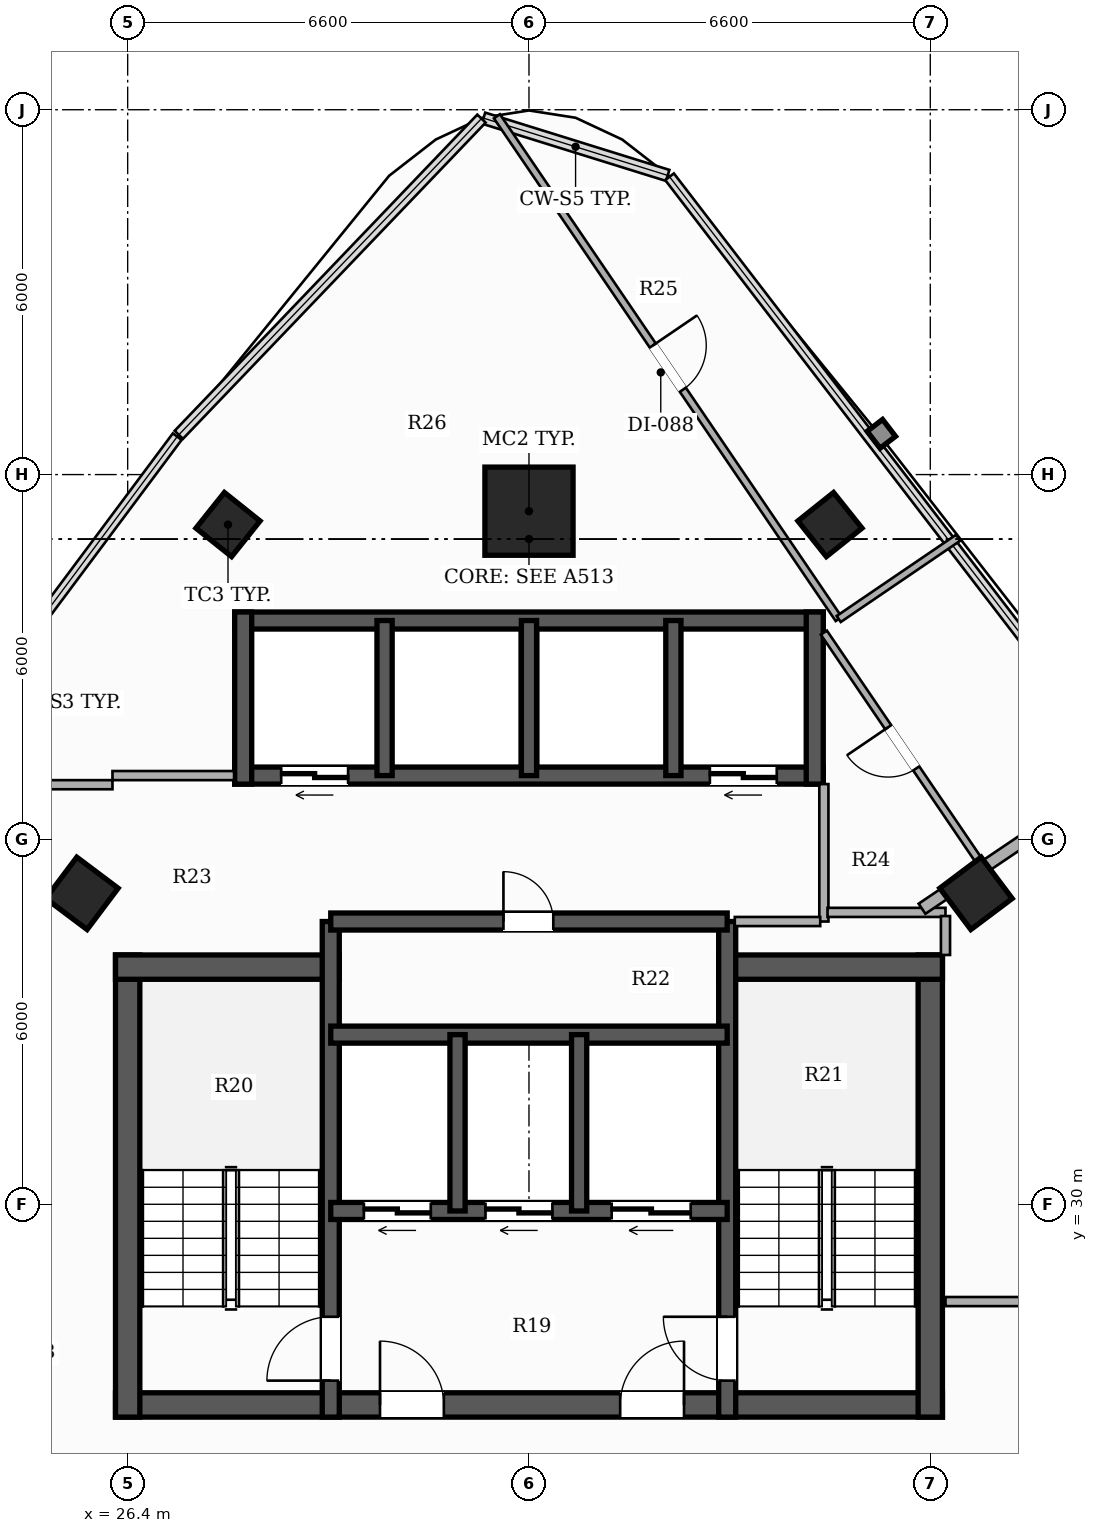
"""IFC4 building model, lengths in metres.
Left out: names, types, materials, properties, quantities, classifications, styles, units other than length and angle.
Written with IfcOpenShell. Run it as: python <this file> out.ifc"""

import sys

from ifc_helpers import new_model, si_unit, direction, frame, frame_2d, origin, origin_2d, place, context, subcontext, project, spatial, rectangle, hollow_rectangle, extrude, element, fill, save


model = new_model("IFC4")
c1 = context("Model", 3, precision=1e-05, world=origin(), true_north=direction((0.0, 1.0)))
c2 = subcontext(c1, "Body", "Model", "MODEL_VIEW")
j1 = project(units=[si_unit("LENGTHUNIT", "METRE"), si_unit("PLANEANGLEUNIT", "RADIAN")], contexts=[c1])
p1 = place(None, origin())
s1 = spatial("IfcSite", under=j1, at=p1, CompositionType="ELEMENT")
p2 = place(p1, origin())
s2 = spatial("IfcBuilding", under=s1, at=p2, CompositionType="ELEMENT")
p3 = place(p2, frame((0.0, 0.0, 167.15)))
s3 = spatial("IfcBuildingStorey", under=s2, at=p3, CompositionType="ELEMENT", Elevation=167.15)
p4 = place(p3, frame((26.2, 26.7, 0.0), z_axis=(0.0, 0.0, 1.0), x_axis=(1.0, 0.0, 0.0)))
e1 = element("IfcWall", 1, at=p4, inside=s3, PredefinedType="SHEAR", context=c2, shape_type="SweptSolid", body=[
    extrude(rectangle(XDim=13.6, YDim=0.4, at=frame_2d((6.8, 0.0))), origin(), (0.0, 0.0, 1.0), 3.3),
])
p5 = place(p4, frame((4.35, 0.0, 0.0)))
e2 = element("IfcOpeningElement", 2, at=p5, cuts=e1, PredefinedType="OPENING", context=c2, shape_type="SweptSolid", body=[
    extrude(rectangle(XDim=1.05, YDim=2.15, at=frame_2d((0.525, 1.075))), frame((0.0, 0.21, 0.0), z_axis=(0.0, -1.0, 0.0), x_axis=(1.0, 0.0, 0.0)), (0.0, 0.0, 1.0), 0.42),
])
p6 = place(p4, frame((8.3, 0.0, 0.0)))
e3 = element("IfcOpeningElement", 3, at=p6, cuts=e1, PredefinedType="OPENING", context=c2, shape_type="SweptSolid", body=[
    extrude(rectangle(XDim=1.05, YDim=2.15, at=frame_2d((0.525, 1.075))), frame((0.0, 0.21, 0.0), z_axis=(0.0, -1.0, 0.0), x_axis=(1.0, 0.0, 0.0)), (0.0, 0.0, 1.0), 0.42),
])
p7 = place(p3, frame((26.4, 26.5, 0.0), z_axis=(0.0, 0.0, 1.0), x_axis=(0.0, 1.0, 0.0)))
e4 = element("IfcWall", 4, at=p7, inside=s3, PredefinedType="SHEAR", context=c2, shape_type="SweptSolid", body=[
    extrude(rectangle(XDim=7.6, YDim=0.4, at=frame_2d((3.8, 0.0))), origin(), (0.0, 0.0, 1.0), 3.3),
])
p8 = place(p3, frame((26.2, 33.9, 0.0), z_axis=(0.0, 0.0, 1.0), x_axis=(1.0, 0.0, 0.0)))
e5 = element("IfcWall", 5, at=p8, inside=s3, PredefinedType="SHEAR", context=c2, shape_type="SweptSolid", body=[
    extrude(rectangle(XDim=3.68, YDim=0.4, at=frame_2d((1.84, 0.0))), origin(), (0.0, 0.0, 1.0), 3.3),
])
p9 = place(p3, frame((39.6, 26.5, 0.0), z_axis=(0.0, 0.0, 1.0), x_axis=(0.0, 1.0, 0.0)))
e6 = element("IfcWall", 6, at=p9, inside=s3, PredefinedType="SHEAR", context=c2, shape_type="SweptSolid", body=[
    extrude(rectangle(XDim=7.6, YDim=0.4, at=frame_2d((3.8, 0.0))), origin(), (0.0, 0.0, 1.0), 3.3),
])
p10 = place(p3, frame((36.12, 33.9, 0.0), z_axis=(0.0, 0.0, 1.0), x_axis=(1.0, 0.0, 0.0)))
e7 = element("IfcWall", 7, at=p10, inside=s3, PredefinedType="SHEAR", context=c2, shape_type="SweptSolid", body=[
    extrude(rectangle(XDim=3.68, YDim=0.4, at=frame_2d((1.84, 0.0))), origin(), (0.0, 0.0, 1.0), 3.3),
])
p11 = place(p3, frame((29.74, 26.5, 0.0), z_axis=(0.0, 0.0, 1.0), x_axis=(0.0, 1.0, 0.0)))
e8 = element("IfcWall", 8, at=p11, inside=s3, PredefinedType="SHEAR", context=c2, shape_type="SweptSolid", body=[
    extrude(rectangle(XDim=8.15, YDim=0.28, at=frame_2d((4.075, 0.0))), origin(), (0.0, 0.0, 1.0), 3.3),
])
p12 = place(p11, frame((0.6, 0.0, 0.0)))
e9 = element("IfcOpeningElement", 9, at=p12, cuts=e8, PredefinedType="OPENING", context=c2, shape_type="SweptSolid", body=[
    extrude(rectangle(XDim=1.05, YDim=2.15, at=frame_2d((0.525, 1.075))), frame((0.0, 0.15, 0.0), z_axis=(0.0, -1.0, 0.0), x_axis=(1.0, 0.0, 0.0)), (0.0, 0.0, 1.0), 0.3),
])
p13 = place(p3, frame((36.26, 26.5, 0.0), z_axis=(0.0, 0.0, 1.0), x_axis=(0.0, 1.0, 0.0)))
e10 = element("IfcWall", 10, at=p13, inside=s3, PredefinedType="SHEAR", context=c2, shape_type="SweptSolid", body=[
    extrude(rectangle(XDim=8.15, YDim=0.28, at=frame_2d((4.075, 0.0))), origin(), (0.0, 0.0, 1.0), 3.3),
])
p14 = place(p13, frame((0.6, 0.0, 0.0)))
e11 = element("IfcOpeningElement", 11, at=p14, cuts=e10, PredefinedType="OPENING", context=c2, shape_type="SweptSolid", body=[
    extrude(rectangle(XDim=1.05, YDim=2.15, at=frame_2d((0.525, 1.075))), frame((0.0, 0.15, 0.0), z_axis=(0.0, -1.0, 0.0), x_axis=(1.0, 0.0, 0.0)), (0.0, 0.0, 1.0), 0.3),
])
p15 = place(p3, frame((36.26, 29.89, 0.0), z_axis=(0.0, 0.0, 1.0), x_axis=(-1.0, 0.0, 0.0)))
e12 = element("IfcWall", 12, at=p15, inside=s3, PredefinedType="SHEAR", context=c2, shape_type="SweptSolid", body=[
    extrude(rectangle(XDim=6.52, YDim=0.28, at=frame_2d((3.26, 0.0))), origin(), (0.0, 0.0, 1.0), 3.3),
])
p16 = place(p15, frame((4.875, 0.0, 0.0)))
e13 = element("IfcOpeningElement", 13, at=p16, cuts=e12, PredefinedType="OPENING", context=c2, shape_type="SweptSolid", body=[
    extrude(rectangle(XDim=1.1, YDim=2.2, at=frame_2d((0.55, 1.1))), frame((0.0, 0.15, 0.0), z_axis=(0.0, -1.0, 0.0), x_axis=(1.0, 0.0, 0.0)), (0.0, 0.0, 1.0), 0.3),
])
p17 = place(p15, frame((2.875, 0.0, 0.0)))
e14 = element("IfcOpeningElement", 14, at=p17, cuts=e12, PredefinedType="OPENING", context=c2, shape_type="SweptSolid", body=[
    extrude(rectangle(XDim=1.1, YDim=2.2, at=frame_2d((0.55, 1.1))), frame((0.0, 0.15, 0.0), z_axis=(0.0, -1.0, 0.0), x_axis=(1.0, 0.0, 0.0)), (0.0, 0.0, 1.0), 0.3),
])
p18 = place(p15, frame((0.6, 0.0, 0.0)))
e15 = element("IfcOpeningElement", 15, at=p18, cuts=e12, PredefinedType="OPENING", context=c2, shape_type="SweptSolid", body=[
    extrude(rectangle(XDim=1.3, YDim=2.2, at=frame_2d((0.65, 1.1))), frame((0.0, 0.15, 0.0), z_axis=(0.0, -1.0, 0.0), x_axis=(1.0, 0.0, 0.0)), (0.0, 0.0, 1.0), 0.3),
])
p19 = place(p3, frame((29.74, 32.79, 0.0), z_axis=(0.0, 0.0, 1.0), x_axis=(1.0, 0.0, 0.0)))
e16 = element("IfcWall", 16, at=p19, inside=s3, PredefinedType="SHEAR", context=c2, shape_type="SweptSolid", body=[
    extrude(rectangle(XDim=6.52, YDim=0.28, at=frame_2d((3.26, 0.0))), origin(), (0.0, 0.0, 1.0), 3.3),
])
for number, where, z_axis, x_axis in (
    (17, (31.825, 29.89, 0.0), (0.0, 0.0, 1.0), (0.0, 1.0, 0.0)),
    (18, (33.825, 29.89, 0.0), (0.0, 0.0, 1.0), (0.0, 1.0, 0.0)),
):
    element("IfcWall", number, at=place(p3, frame(where, z_axis=z_axis, x_axis=x_axis)), inside=s3, PredefinedType="SHEAR", context=c2, shape_type="SweptSolid", body=[
        extrude(rectangle(XDim=2.9, YDim=0.25, at=frame_2d((1.45, 0.0))), origin(), (0.0, 0.0, 1.0), 3.3),
    ])
p20 = place(p3, frame((29.74, 34.65, 0.0), z_axis=(0.0, 0.0, 1.0), x_axis=(1.0, 0.0, 0.0)))
e19 = element("IfcWall", 19, at=p20, inside=s3, PredefinedType="SHEAR", context=c2, shape_type="SweptSolid", body=[
    extrude(rectangle(XDim=6.52, YDim=0.28, at=frame_2d((3.26, 0.0))), origin(), (0.0, 0.0, 1.0), 3.3),
])
p21 = place(p20, frame((2.84, 0.0, 0.0)))
e20 = element("IfcOpeningElement", 20, at=p21, cuts=e19, PredefinedType="OPENING", context=c2, shape_type="SweptSolid", body=[
    extrude(rectangle(XDim=0.82, YDim=2.1, at=frame_2d((0.41, 1.05))), frame((0.0, 0.15, 0.0), z_axis=(0.0, -1.0, 0.0), x_axis=(1.0, 0.0, 0.0)), (0.0, 0.0, 1.0), 0.3),
])
p22 = place(p3, frame((37.84, 37.05, 0.0), z_axis=(0.0, 0.0, 1.0), x_axis=(-1.0, 0.0, 0.0)))
e21 = element("IfcWall", 21, at=p22, inside=s3, PredefinedType="SHEAR", context=c2, shape_type="SweptSolid", body=[
    extrude(rectangle(XDim=9.68, YDim=0.28, at=frame_2d((4.84, 0.0))), origin(), (0.0, 0.0, 1.0), 3.3),
])
p23 = place(p22, frame((7.815, 0.0, 0.0)))
e22 = element("IfcOpeningElement", 22, at=p23, cuts=e21, PredefinedType="OPENING", context=c2, shape_type="SweptSolid", body=[
    extrude(rectangle(XDim=1.1, YDim=2.2, at=frame_2d((0.55, 1.1))), frame((0.0, 0.15, 0.0), z_axis=(0.0, -1.0, 0.0), x_axis=(1.0, 0.0, 0.0)), (0.0, 0.0, 1.0), 0.3),
])
p24 = place(p22, frame((0.765, 0.0, 0.0)))
e23 = element("IfcOpeningElement", 23, at=p24, cuts=e21, PredefinedType="OPENING", context=c2, shape_type="SweptSolid", body=[
    extrude(rectangle(XDim=1.1, YDim=2.2, at=frame_2d((0.55, 1.1))), frame((0.0, 0.15, 0.0), z_axis=(0.0, -1.0, 0.0), x_axis=(1.0, 0.0, 0.0)), (0.0, 0.0, 1.0), 0.3),
])
p25 = place(p3, frame((28.16, 39.6, 0.0), z_axis=(0.0, 0.0, 1.0), x_axis=(1.0, 0.0, 0.0)))
e24 = element("IfcWall", 24, at=p25, inside=s3, PredefinedType="SHEAR", context=c2, shape_type="SweptSolid", body=[
    extrude(rectangle(XDim=9.68, YDim=0.28, at=frame_2d((4.84, 0.0))), origin(), (0.0, 0.0, 1.0), 3.3),
])
for number, where, z_axis, x_axis in (
    (25, (28.3, 36.91, 0.0), (0.0, 0.0, 1.0), (0.0, 1.0, 0.0)),
    (26, (37.7, 36.91, 0.0), (0.0, 0.0, 1.0), (0.0, 1.0, 0.0)),
):
    element("IfcWall", number, at=place(p3, frame(where, z_axis=z_axis, x_axis=x_axis)), inside=s3, PredefinedType="SHEAR", context=c2, shape_type="SweptSolid", body=[
        extrude(rectangle(XDim=2.83, YDim=0.28, at=frame_2d((1.415, 0.0))), origin(), (0.0, 0.0, 1.0), 3.3),
    ])
for number, where, z_axis, x_axis in (
    (27, (30.625, 37.05, 0.0), (0.0, 0.0, 1.0), (0.0, 1.0, 0.0)),
    (28, (33.0, 37.05, 0.0), (0.0, 0.0, 1.0), (0.0, 1.0, 0.0)),
    (29, (35.375, 37.05, 0.0), (0.0, 0.0, 1.0), (0.0, 1.0, 0.0)),
):
    element("IfcWall", number, at=place(p3, frame(where, z_axis=z_axis, x_axis=x_axis)), inside=s3, PredefinedType="SHEAR", context=c2, shape_type="SweptSolid", body=[
        extrude(rectangle(XDim=2.55, YDim=0.25, at=frame_2d((1.275, 0.0))), origin(), (0.0, 0.0, 1.0), 3.3),
    ])
p26 = place(p3, frame((33.0, 41.398, 0.0), z_axis=(0.0, 0.0, 1.0), x_axis=(1.0, 0.0, 0.0)))
e30 = element("IfcColumn", 30, at=p26, inside=s3, PredefinedType="COLUMN", context=c2, shape_type="SweptSolid", body=[
    extrude(hollow_rectangle(XDim=1.45, YDim=1.45, WallThickness=0.045, at=origin_2d()), origin(), (0.0, 0.0, 1.0), 3.3),
])
for number, where, z_axis, x_axis in (
    (31, (25.648, 35.113, 0.0), (0.0, 0.0, 1.0), (0.6, 0.8, 0.0)),
    (32, (40.352, 35.113, 0.0), (0.0, 0.0, 1.0), (-0.6, 0.8, 0.0)),
):
    element("IfcColumn", number, at=place(p3, frame(where, z_axis=z_axis, x_axis=x_axis)), inside=s3, PredefinedType="COLUMN", context=c2, shape_type="SweptSolid", body=[
        extrude(hollow_rectangle(XDim=0.85, YDim=0.85, WallThickness=0.028, at=origin_2d()), origin(), (0.0, 0.0, 1.0), 3.3),
    ])
for number, where, z_axis, x_axis in (
    (33, (28.05, 41.178, 0.0), (0.0, 0.0, 1.0), (0.624, 0.782, 0.0)),
    (34, (37.95, 41.178, 0.0), (0.0, 0.0, 1.0), (-0.624, 0.782, 0.0)),
):
    element("IfcColumn", number, at=place(p3, frame(where, z_axis=z_axis, x_axis=x_axis)), inside=s3, PredefinedType="COLUMN", context=c2, shape_type="SweptSolid", body=[
        extrude(hollow_rectangle(XDim=0.75, YDim=0.75, WallThickness=0.025, at=origin_2d()), origin(), (0.0, 0.0, 1.0), 3.3),
    ])
p27 = place(p3, frame((37.85, 34.65, 0.0), z_axis=(0.0, 0.0, 1.0), x_axis=(0.0, 1.0, 0.0)))
e35 = element("IfcWall", 35, at=p27, inside=s3, PredefinedType="PARTITIONING", context=c2, shape_type="SweptSolid", body=[
    extrude(rectangle(XDim=2.26, YDim=0.15, at=frame_2d((1.13, 0.0))), origin(), (0.0, 0.0, 1.0), 3.06),
])
p28 = place(p3, frame((36.385, 34.65, 0.0), z_axis=(0.0, 0.0, 1.0), x_axis=(1.0, 0.0, 0.0)))
e36 = element("IfcWall", 36, at=p28, inside=s3, PredefinedType="PARTITIONING", context=c2, shape_type="SweptSolid", body=[
    extrude(rectangle(XDim=1.405, YDim=0.15, at=frame_2d((0.703, 0.0))), origin(), (0.0, 0.0, 1.0), 2.425),
])
p29 = place(p3, frame((23.56, 36.9, 0.0), z_axis=(0.0, 0.0, 1.0), x_axis=(1.0, 0.0, 0.0)))
e37 = element("IfcWall", 37, at=p29, inside=s3, PredefinedType="PARTITIONING", context=c2, shape_type="SweptSolid", body=[
    extrude(rectangle(XDim=2.59, YDim=0.15, at=frame_2d((1.295, 0.0))), origin(), (0.0, 0.0, 1.0), 2.413),
])
p30 = place(p3, frame((39.85, 28.4, 0.0), z_axis=(0.0, 0.0, 1.0), x_axis=(1.0, 0.0, 0.0)))
e38 = element("IfcWall", 38, at=p30, inside=s3, PredefinedType="PARTITIONING", context=c2, shape_type="SweptSolid", body=[
    extrude(rectangle(XDim=2.5, YDim=0.15, at=frame_2d((1.25, 0.0))), origin(), (0.0, 0.0, 1.0), 2.721),
])
p31 = place(p3, frame((26.15, 37.05, 0.0), z_axis=(0.0, 0.0, 1.0), x_axis=(1.0, 0.0, 0.0)))
e39 = element("IfcWall", 39, at=p31, inside=s3, PredefinedType="PARTITIONING", context=c2, shape_type="SweptSolid", body=[
    extrude(rectangle(XDim=2.0, YDim=0.15, at=frame_2d((1.0, 0.0))), origin(), (0.0, 0.0, 1.0), 2.413),
])
p32 = place(p3, frame((37.91, 34.8, 0.0), z_axis=(0.0, 0.0, 1.0), x_axis=(1.0, 0.0, 0.0)))
e40 = element("IfcWall", 40, at=p32, inside=s3, PredefinedType="PARTITIONING", context=c2, shape_type="SweptSolid", body=[
    extrude(rectangle(XDim=1.94, YDim=0.15, at=frame_2d((0.97, 0.0))), origin(), (0.0, 0.0, 1.0), 2.721),
])
p33 = place(p3, frame((39.85, 34.74, 0.0), z_axis=(0.0, 0.0, 1.0), x_axis=(0.0, -1.0, 0.0)))
e41 = element("IfcWall", 41, at=p33, inside=s3, PredefinedType="PARTITIONING", context=c2, shape_type="SweptSolid", body=[
    extrude(rectangle(XDim=0.64, YDim=0.15, at=frame_2d((0.32, 0.0))), origin(), (0.0, 0.0, 1.0), 2.721),
])
p34 = place(p3, frame((39.464, 34.86, 0.0), z_axis=(0.0, 0.0, 1.0), x_axis=(0.828976210701, 0.559283865395, 0.0)))
e42 = element("IfcWall", 42, at=p34, inside=s3, PredefinedType="PARTITIONING", context=c2, shape_type="SweptSolid", body=[
    extrude(rectangle(XDim=4.171, YDim=0.2, at=frame_2d((2.086, 0.0))), origin(), (0.0, 0.0, 1.0), 2.413),
])
p35 = place(p3, frame((40.427, 35.612, 0.0), z_axis=(0.0, 0.0, 1.0), x_axis=(-0.562385802303, 0.826874965982, 0.0)))
e43 = element("IfcWall", 43, at=p35, inside=s3, PredefinedType="PARTITIONING", context=c2, shape_type="SweptSolid", body=[
    extrude(rectangle(XDim=4.582, YDim=0.12, at=frame_2d((2.291, 0.0))), origin(), (0.0, 0.0, 1.0), 2.413),
])
p36 = place(p35, frame((1.881, 0.0, 0.0)))
e44 = element("IfcOpeningElement", 44, at=p36, cuts=e43, PredefinedType="OPENING", context=c2, shape_type="SweptSolid", body=[
    extrude(rectangle(XDim=0.82, YDim=2.1, at=frame_2d((0.41, 1.05))), frame((0.0, 0.07, 0.0), z_axis=(0.0, -1.0, 0.0), x_axis=(1.0, 0.0, 0.0)), (0.0, 0.0, 1.0), 0.14),
])
p37 = place(p3, frame((32.473, 47.892, 0.0), z_axis=(0.0, 0.0, 1.0), x_axis=(0.562273950157, -0.826951029369, 0.0)))
e45 = element("IfcWall", 45, at=p37, inside=s3, PredefinedType="PARTITIONING", context=c2, shape_type="SweptSolid", body=[
    extrude(rectangle(XDim=9.997, YDim=0.12, at=frame_2d((4.999, 0.0))), origin(), (0.0, 0.0, 1.0), 2.413),
])
p38 = place(p37, frame((4.558, 0.0, 0.0)))
e46 = element("IfcOpeningElement", 46, at=p38, cuts=e45, PredefinedType="OPENING", context=c2, shape_type="SweptSolid", body=[
    extrude(rectangle(XDim=0.88, YDim=2.1, at=frame_2d((0.44, 1.05))), frame((0.0, 0.07, 0.0), z_axis=(0.0, -1.0, 0.0), x_axis=(1.0, 0.0, 0.0)), (0.0, 0.0, 1.0), 0.14),
])
p39 = place(p3, frame((38.094, 39.625, 0.0), z_axis=(0.0, 0.0, 1.0), x_axis=(0.826798473187, 0.562498253096, 0.0)))
e47 = element("IfcWall", 47, at=p39, inside=s3, PredefinedType="PARTITIONING", context=c2, shape_type="SweptSolid", body=[
    extrude(rectangle(XDim=2.377, YDim=0.12, at=frame_2d((1.188, 0.0))), origin(), (0.0, 0.0, 1.0), 2.413),
])
p40 = place(p12, origin())
e48 = element("IfcDoor", 48, at=p40, inside=s3, OperationType="SINGLE_SWING_LEFT", PredefinedType="DOOR", context=c2, shape_type="SweptSolid", body=[
    extrude(rectangle(XDim=1.05, YDim=2.15, at=frame_2d((0.525, 1.075))), frame((0.0, 0.025, 0.0), z_axis=(0.0, -1.0, 0.0), x_axis=(1.0, 0.0, 0.0)), (0.0, 0.0, 1.0), 0.05),
])
fill(e9, e48)
p41 = place(p14, origin())
e49 = element("IfcDoor", 49, at=p41, inside=s3, OperationType="SINGLE_SWING_RIGHT", PredefinedType="DOOR", context=c2, shape_type="SweptSolid", body=[
    extrude(rectangle(XDim=1.05, YDim=2.15, at=frame_2d((0.525, 1.075))), frame((0.0, 0.025, 0.0), z_axis=(0.0, -1.0, 0.0), x_axis=(1.0, 0.0, 0.0)), (0.0, 0.0, 1.0), 0.05),
])
fill(e11, e49)
p42 = place(p5, origin())
e50 = element("IfcDoor", 50, at=p42, inside=s3, OperationType="SINGLE_SWING_LEFT", PredefinedType="DOOR", context=c2, shape_type="SweptSolid", body=[
    extrude(rectangle(XDim=1.05, YDim=2.15, at=frame_2d((0.525, 1.075))), frame((0.0, 0.025, 0.0), z_axis=(0.0, -1.0, 0.0), x_axis=(1.0, 0.0, 0.0)), (0.0, 0.0, 1.0), 0.05),
])
fill(e2, e50)
p43 = place(p6, origin())
e51 = element("IfcDoor", 51, at=p43, inside=s3, OperationType="SINGLE_SWING_RIGHT", PredefinedType="DOOR", context=c2, shape_type="SweptSolid", body=[
    extrude(rectangle(XDim=1.05, YDim=2.15, at=frame_2d((0.525, 1.075))), frame((0.0, 0.025, 0.0), z_axis=(0.0, -1.0, 0.0), x_axis=(1.0, 0.0, 0.0)), (0.0, 0.0, 1.0), 0.05),
])
fill(e3, e51)
p44 = place(p16, origin())
e52 = element("IfcDoor", 52, at=p44, inside=s3, OperationType="DOUBLE_DOOR_SLIDING", PredefinedType="DOOR", context=c2, shape_type="SweptSolid", body=[
    extrude(rectangle(XDim=1.1, YDim=2.2, at=frame_2d((0.55, 1.1))), frame((0.0, 0.025, 0.0), z_axis=(0.0, -1.0, 0.0), x_axis=(1.0, 0.0, 0.0)), (0.0, 0.0, 1.0), 0.05),
])
fill(e13, e52)
p45 = place(p17, origin())
e53 = element("IfcDoor", 53, at=p45, inside=s3, OperationType="DOUBLE_DOOR_SLIDING", PredefinedType="DOOR", context=c2, shape_type="SweptSolid", body=[
    extrude(rectangle(XDim=1.1, YDim=2.2, at=frame_2d((0.55, 1.1))), frame((0.0, 0.025, 0.0), z_axis=(0.0, -1.0, 0.0), x_axis=(1.0, 0.0, 0.0)), (0.0, 0.0, 1.0), 0.05),
])
fill(e14, e53)
p46 = place(p18, origin())
e54 = element("IfcDoor", 54, at=p46, inside=s3, OperationType="DOUBLE_DOOR_SLIDING", PredefinedType="DOOR", context=c2, shape_type="SweptSolid", body=[
    extrude(rectangle(XDim=1.3, YDim=2.2, at=frame_2d((0.65, 1.1))), frame((0.0, 0.025, 0.0), z_axis=(0.0, -1.0, 0.0), x_axis=(1.0, 0.0, 0.0)), (0.0, 0.0, 1.0), 0.05),
])
fill(e15, e54)
p47 = place(p23, origin())
e55 = element("IfcDoor", 55, at=p47, inside=s3, OperationType="DOUBLE_DOOR_SLIDING", PredefinedType="DOOR", context=c2, shape_type="SweptSolid", body=[
    extrude(rectangle(XDim=1.1, YDim=2.2, at=frame_2d((0.55, 1.1))), frame((0.0, 0.025, 0.0), z_axis=(0.0, -1.0, 0.0), x_axis=(1.0, 0.0, 0.0)), (0.0, 0.0, 1.0), 0.05),
])
fill(e22, e55)
p48 = place(p24, origin())
e56 = element("IfcDoor", 56, at=p48, inside=s3, OperationType="DOUBLE_DOOR_SLIDING", PredefinedType="DOOR", context=c2, shape_type="SweptSolid", body=[
    extrude(rectangle(XDim=1.1, YDim=2.2, at=frame_2d((0.55, 1.1))), frame((0.0, 0.025, 0.0), z_axis=(0.0, -1.0, 0.0), x_axis=(1.0, 0.0, 0.0)), (0.0, 0.0, 1.0), 0.05),
])
fill(e23, e56)
p49 = place(p21, origin())
e57 = element("IfcDoor", 57, at=p49, inside=s3, OperationType="SINGLE_SWING_LEFT", PredefinedType="DOOR", context=c2, shape_type="SweptSolid", body=[
    extrude(rectangle(XDim=0.82, YDim=2.1, at=frame_2d((0.41, 1.05))), frame((0.0, 0.025, 0.0), z_axis=(0.0, -1.0, 0.0), x_axis=(1.0, 0.0, 0.0)), (0.0, 0.0, 1.0), 0.05),
])
fill(e20, e57)
p50 = place(p36, origin())
e58 = element("IfcDoor", 58, at=p50, inside=s3, OperationType="SINGLE_SWING_RIGHT", PredefinedType="DOOR", context=c2, shape_type="SweptSolid", body=[
    extrude(rectangle(XDim=0.82, YDim=2.1, at=frame_2d((0.41, 1.05))), frame((0.0, 0.025, 0.0), z_axis=(0.0, -1.0, 0.0), x_axis=(1.0, 0.0, 0.0)), (0.0, 0.0, 1.0), 0.05),
])
fill(e44, e58)
p51 = place(p38, origin())
e59 = element("IfcDoor", 59, at=p51, inside=s3, OperationType="SINGLE_SWING_LEFT", PredefinedType="DOOR", context=c2, shape_type="SweptSolid", body=[
    extrude(rectangle(XDim=0.88, YDim=2.1, at=frame_2d((0.44, 1.05))), frame((0.0, 0.025, 0.0), z_axis=(0.0, -1.0, 0.0), x_axis=(1.0, 0.0, 0.0)), (0.0, 0.0, 1.0), 0.05),
])
fill(e46, e59)
save(model, sys.argv[1])
